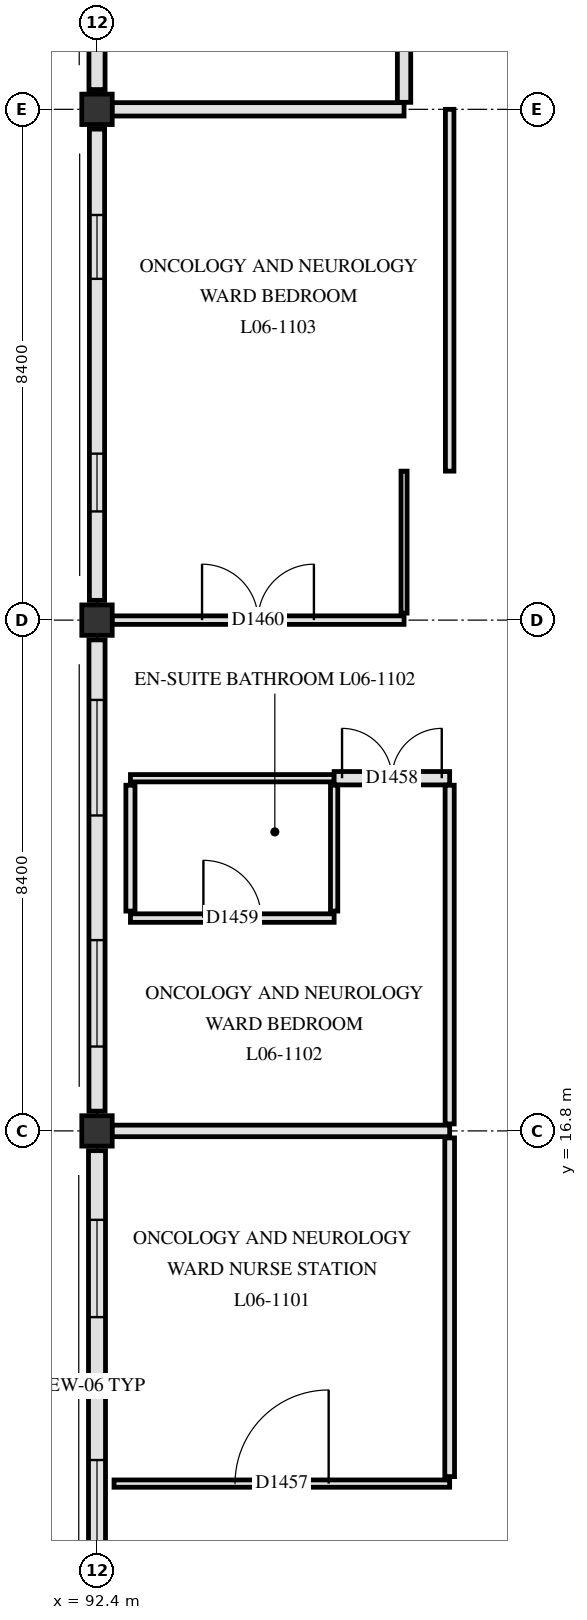
"""IFC4 building model, lengths in metres.
Left out: names, types, materials, properties, quantities, classifications, styles, units other than length and angle.
Written with IfcOpenShell. Run it as: python <this file> out.ifc"""

import sys

from ifc_helpers import new_model, si_unit, direction, frame, frame_2d, origin, origin_2d, place, context, subcontext, project, spatial, rectangle, extrude, element, fill, save


model = new_model("IFC4")
c1 = context("Model", 3, precision=1e-05, world=origin(), true_north=direction((0.0, 1.0)))
c2 = subcontext(c1, "Body", "Model", "MODEL_VIEW")
j1 = project(units=[si_unit("LENGTHUNIT", "METRE"), si_unit("PLANEANGLEUNIT", "RADIAN")], contexts=[c1])
p1 = place(None, origin())
s1 = spatial("IfcSite", under=j1, at=p1, CompositionType="ELEMENT")
p2 = place(p1, origin())
s2 = spatial("IfcBuilding", under=s1, at=p2, CompositionType="ELEMENT")
p3 = place(p2, frame((0.0, 0.0, 26.4)))
s3 = spatial("IfcBuildingStorey", under=s2, at=p3, CompositionType="ELEMENT", Elevation=26.4)
for number, where, z_axis, x_axis in (
    (1, (92.4, 16.8, 0.0), (0.0, 0.0, 1.0), (1.0, 0.0, 0.0)),
    (2, (92.4, 25.2, 0.0), (0.0, 0.0, 1.0), (1.0, 0.0, 0.0)),
    (3, (92.4, 33.6, 0.0), (0.0, 0.0, 1.0), (1.0, 0.0, 0.0)),
):
    element("IfcColumn", number, at=place(p3, frame(where, z_axis=z_axis, x_axis=x_axis)), inside=s3, PredefinedType="COLUMN", context=c2, shape_type="SweptSolid", body=[
        extrude(rectangle(XDim=0.5, YDim=0.5, at=origin_2d()), origin(), (0.0, 0.0, 1.0), 3.9),
    ])
p4 = place(p3, frame((92.4, 33.925, 0.0), z_axis=(0.0, 0.0, 1.0), x_axis=(0.0, 1.0, 0.0)))
e4 = element("IfcWall", 4, at=p4, inside=s3, PredefinedType="SOLIDWALL", context=c2, shape_type="SweptSolid", body=[
    extrude(rectangle(XDim=7.75, YDim=0.265, at=frame_2d((3.875, 0.0))), origin(), (0.0, 0.0, 1.0), 3.38),
])
p5 = place(p4, frame((1.062, 0.0, 0.85)))
e5 = element("IfcOpeningElement", 5, at=p5, cuts=e4, PredefinedType="OPENING", context=c2, shape_type="SweptSolid", body=[
    extrude(rectangle(XDim=1.75, YDim=1.3, at=frame_2d((0.875, 0.65))), frame((0.0, 0.142, 0.0), z_axis=(0.0, -1.0, 0.0), x_axis=(1.0, 0.0, 0.0)), (0.0, 0.0, 1.0), 0.285),
])
p6 = place(p4, frame((4.887, 0.0, 0.85)))
e6 = element("IfcOpeningElement", 6, at=p6, cuts=e4, PredefinedType="OPENING", context=c2, shape_type="SweptSolid", body=[
    extrude(rectangle(XDim=1.85, YDim=1.3, at=frame_2d((0.925, 0.65))), frame((0.0, 0.142, 0.0), z_axis=(0.0, -1.0, 0.0), x_axis=(1.0, 0.0, 0.0)), (0.0, 0.0, 1.0), 0.285),
])
p7 = place(p3, frame((92.4, 8.725, 0.0), z_axis=(0.0, 0.0, 1.0), x_axis=(0.0, 1.0, 0.0)))
e7 = element("IfcWall", 7, at=p7, inside=s3, PredefinedType="SOLIDWALL", context=c2, shape_type="SweptSolid", body=[
    extrude(rectangle(XDim=7.75, YDim=0.28, at=frame_2d((3.875, 0.0))), origin(), (0.0, 0.0, 1.0), 3.34),
])
p8 = place(p7, frame((1.212, 0.0, 0.85)))
e8 = element("IfcOpeningElement", 8, at=p8, cuts=e7, PredefinedType="OPENING", context=c2, shape_type="SweptSolid", body=[
    extrude(rectangle(XDim=1.45, YDim=1.78, at=frame_2d((0.725, 0.89))), frame((0.0, 0.15, 0.0), z_axis=(0.0, -1.0, 0.0), x_axis=(1.0, 0.0, 0.0)), (0.0, 0.0, 1.0), 0.3),
])
p9 = place(p7, frame((5.012, 0.0, 0.85)))
e9 = element("IfcOpeningElement", 9, at=p9, cuts=e7, PredefinedType="OPENING", context=c2, shape_type="SweptSolid", body=[
    extrude(rectangle(XDim=1.6, YDim=1.78, at=frame_2d((0.8, 0.89))), frame((0.0, 0.15, 0.0), z_axis=(0.0, -1.0, 0.0), x_axis=(1.0, 0.0, 0.0)), (0.0, 0.0, 1.0), 0.3),
])
p10 = place(p3, frame((92.4, 17.125, 0.0), z_axis=(0.0, 0.0, 1.0), x_axis=(0.0, 1.0, 0.0)))
e10 = element("IfcWall", 10, at=p10, inside=s3, PredefinedType="SOLIDWALL", context=c2, shape_type="SweptSolid", body=[
    extrude(rectangle(XDim=7.75, YDim=0.265, at=frame_2d((3.875, 0.0))), origin(), (0.0, 0.0, 1.0), 3.38),
])
p11 = place(p10, frame((1.062, 0.0, 0.85)))
e11 = element("IfcOpeningElement", 11, at=p11, cuts=e10, PredefinedType="OPENING", context=c2, shape_type="SweptSolid", body=[
    extrude(rectangle(XDim=1.75, YDim=1.78, at=frame_2d((0.875, 0.89))), frame((0.0, 0.142, 0.0), z_axis=(0.0, -1.0, 0.0), x_axis=(1.0, 0.0, 0.0)), (0.0, 0.0, 1.0), 0.285),
])
p12 = place(p10, frame((4.863, 0.0, 0.85)))
e12 = element("IfcOpeningElement", 12, at=p12, cuts=e10, PredefinedType="OPENING", context=c2, shape_type="SweptSolid", body=[
    extrude(rectangle(XDim=1.9, YDim=1.78, at=frame_2d((0.95, 0.89))), frame((0.0, 0.142, 0.0), z_axis=(0.0, -1.0, 0.0), x_axis=(1.0, 0.0, 0.0)), (0.0, 0.0, 1.0), 0.285),
])
p13 = place(p3, frame((92.4, 25.525, 0.0), z_axis=(0.0, 0.0, 1.0), x_axis=(0.0, 1.0, 0.0)))
e13 = element("IfcWall", 13, at=p13, inside=s3, PredefinedType="SOLIDWALL", context=c2, shape_type="SweptSolid", body=[
    extrude(rectangle(XDim=7.75, YDim=0.25, at=frame_2d((3.875, 0.0))), origin(), (0.0, 0.0, 1.0), 3.38),
])
p14 = place(p13, frame((1.462, 0.0, 0.85)))
e14 = element("IfcOpeningElement", 14, at=p14, cuts=e13, PredefinedType="OPENING", context=c2, shape_type="SweptSolid", body=[
    extrude(rectangle(XDim=0.95, YDim=1.3, at=frame_2d((0.475, 0.65))), frame((0.0, 0.135, 0.0), z_axis=(0.0, -1.0, 0.0), x_axis=(1.0, 0.0, 0.0)), (0.0, 0.0, 1.0), 0.27),
])
p15 = place(p13, frame((5.288, 0.0, 0.85)))
e15 = element("IfcOpeningElement", 15, at=p15, cuts=e13, PredefinedType="OPENING", context=c2, shape_type="SweptSolid", body=[
    extrude(rectangle(XDim=1.05, YDim=1.3, at=frame_2d((0.525, 0.65))), frame((0.0, 0.135, 0.0), z_axis=(0.0, -1.0, 0.0), x_axis=(1.0, 0.0, 0.0)), (0.0, 0.0, 1.0), 0.27),
])
p16 = place(p3, frame((92.68, 11.0, 0.0), z_axis=(0.0, 0.0, 1.0), x_axis=(1.0, 0.0, 0.0)))
e16 = element("IfcWall", 16, at=p16, inside=s3, PredefinedType="PARTITIONING", context=c2, shape_type="SweptSolid", body=[
    extrude(rectangle(XDim=5.52, YDim=0.12, at=frame_2d((2.76, 0.0))), origin(), (0.0, 0.0, 1.0), 3.61),
])
p17 = place(p16, frame((1.99, 0.0, 0.0)))
e17 = element("IfcOpeningElement", 17, at=p17, cuts=e16, PredefinedType="OPENING", context=c2, shape_type="SweptSolid", body=[
    extrude(rectangle(XDim=1.54, YDim=2.24, at=frame_2d((0.77, 1.12))), frame((0.0, 0.07, 0.0), z_axis=(0.0, -1.0, 0.0), x_axis=(1.0, 0.0, 0.0)), (0.0, 0.0, 1.0), 0.14),
])
p18 = place(p3, frame((92.645, 16.8, 0.0), z_axis=(0.0, 0.0, 1.0), x_axis=(1.0, 0.0, 0.0)))
e18 = element("IfcWall", 18, at=p18, inside=s3, PredefinedType="PARTITIONING", context=c2, shape_type="SweptSolid", body=[
    extrude(rectangle(XDim=5.555, YDim=0.19, at=frame_2d((2.777, 0.0))), origin(), (0.0, 0.0, 1.0), 3.21),
])
p19 = place(p3, frame((92.95, 20.3, 0.0), z_axis=(0.0, 0.0, 1.0), x_axis=(1.0, 0.0, 0.0)))
e19 = element("IfcWall", 19, at=p19, inside=s3, PredefinedType="PARTITIONING", context=c2, shape_type="SweptSolid", body=[
    extrude(rectangle(XDim=3.35, YDim=0.14, at=frame_2d((1.675, 0.0))), origin(), (0.0, 0.0, 1.0), 3.61),
])
p20 = place(p19, frame((1.2, 0.0, 0.0)))
e20 = element("IfcOpeningElement", 20, at=p20, cuts=e19, PredefinedType="OPENING", context=c2, shape_type="SweptSolid", body=[
    extrude(rectangle(XDim=0.95, YDim=2.1, at=frame_2d((0.475, 1.05))), frame((0.0, 0.08, 0.0), z_axis=(0.0, -1.0, 0.0), x_axis=(1.0, 0.0, 0.0)), (0.0, 0.0, 1.0), 0.16),
])
p21 = place(p3, frame((92.95, 22.6, 0.0), z_axis=(0.0, 0.0, 1.0), x_axis=(1.0, 0.0, 0.0)))
e21 = element("IfcWall", 21, at=p21, inside=s3, PredefinedType="PARTITIONING", context=c2, shape_type="SweptSolid", body=[
    extrude(rectangle(XDim=3.35, YDim=0.12, at=frame_2d((1.675, 0.0))), origin(), (0.0, 0.0, 1.0), 3.61),
])
p22 = place(p3, frame((96.3, 22.6, 0.0), z_axis=(0.0, 0.0, 1.0), x_axis=(1.0, 0.0, 0.0)))
e22 = element("IfcWall", 22, at=p22, inside=s3, PredefinedType="PARTITIONING", context=c2, shape_type="SweptSolid", body=[
    extrude(rectangle(XDim=1.9, YDim=0.22, at=frame_2d((0.95, 0.0))), origin(), (0.0, 0.0, 1.0), 3.34),
])
p23 = place(p22, frame((0.13, 0.0, 0.0)))
e23 = element("IfcOpeningElement", 23, at=p23, cuts=e22, PredefinedType="OPENING", context=c2, shape_type="SweptSolid", body=[
    extrude(rectangle(XDim=1.64, YDim=2.28, at=frame_2d((0.82, 1.14))), frame((0.0, 0.12, 0.0), z_axis=(0.0, -1.0, 0.0), x_axis=(1.0, 0.0, 0.0)), (0.0, 0.0, 1.0), 0.24),
])
p24 = place(p3, frame((92.645, 25.2, 0.0), z_axis=(0.0, 0.0, 1.0), x_axis=(1.0, 0.0, 0.0)))
e24 = element("IfcWall", 24, at=p24, inside=s3, PredefinedType="PARTITIONING", context=c2, shape_type="SweptSolid", body=[
    extrude(rectangle(XDim=4.805, YDim=0.14, at=frame_2d((2.402, 0.0))), origin(), (0.0, 0.0, 1.0), 3.21),
])
p25 = place(p24, frame((1.482, 0.0, 0.0)))
e25 = element("IfcOpeningElement", 25, at=p25, cuts=e24, PredefinedType="OPENING", context=c2, shape_type="SweptSolid", body=[
    extrude(rectangle(XDim=1.84, YDim=2.28, at=frame_2d((0.92, 1.14))), frame((0.0, 0.08, 0.0), z_axis=(0.0, -1.0, 0.0), x_axis=(1.0, 0.0, 0.0)), (0.0, 0.0, 1.0), 0.16),
])
p26 = place(p3, frame((92.645, 33.6, 0.0), z_axis=(0.0, 0.0, 1.0), x_axis=(1.0, 0.0, 0.0)))
e26 = element("IfcWall", 26, at=p26, inside=s3, PredefinedType="PARTITIONING", context=c2, shape_type="SweptSolid", body=[
    extrude(rectangle(XDim=4.805, YDim=0.22, at=frame_2d((2.402, 0.0))), origin(), (0.0, 0.0, 1.0), 3.21),
])
p27 = place(p3, frame((92.95, 20.415, 0.0), z_axis=(0.0, 0.0, 1.0), x_axis=(0.0, 1.0, 0.0)))
e27 = element("IfcWall", 27, at=p27, inside=s3, PredefinedType="PARTITIONING", context=c2, shape_type="SweptSolid", body=[
    extrude(rectangle(XDim=2.07, YDim=0.15, at=frame_2d((1.035, 0.0))), origin(), (0.0, 0.0, 1.0), 3.34),
])
p28 = place(p3, frame((96.3, 20.415, 0.0), z_axis=(0.0, 0.0, 1.0), x_axis=(0.0, 1.0, 0.0)))
e28 = element("IfcWall", 28, at=p28, inside=s3, PredefinedType="PARTITIONING", context=c2, shape_type="SweptSolid", body=[
    extrude(rectangle(XDim=2.07, YDim=0.12, at=frame_2d((1.035, 0.0))), origin(), (0.0, 0.0, 1.0), 3.34),
])
p29 = place(p3, frame((97.45, 25.315, 0.0), z_axis=(0.0, 0.0, 1.0), x_axis=(0.0, 1.0, 0.0)))
e29 = element("IfcWall", 29, at=p29, inside=s3, PredefinedType="PARTITIONING", context=c2, shape_type="SweptSolid", body=[
    extrude(rectangle(XDim=2.335, YDim=0.1, at=frame_2d((1.167, 0.0))), origin(), (0.0, 0.0, 1.0), 3.61),
])
p30 = place(p3, frame((97.45, 33.715, 0.0), z_axis=(0.0, 0.0, 1.0), x_axis=(0.0, 1.0, 0.0)))
e30 = element("IfcWall", 30, at=p30, inside=s3, PredefinedType="PARTITIONING", context=c2, shape_type="SweptSolid", body=[
    extrude(rectangle(XDim=2.335, YDim=0.22, at=frame_2d((1.167, 0.0))), origin(), (0.0, 0.0, 1.0), 3.61),
])
p31 = place(p3, frame((98.2, 11.115, 0.0), z_axis=(0.0, 0.0, 1.0), x_axis=(0.0, 1.0, 0.0)))
e31 = element("IfcWall", 31, at=p31, inside=s3, PredefinedType="PARTITIONING", context=c2, shape_type="SweptSolid", body=[
    extrude(rectangle(XDim=5.57, YDim=0.16, at=frame_2d((2.785, 0.0))), origin(), (0.0, 0.0, 1.0), 3.34),
])
p32 = place(p3, frame((98.2, 16.915, 0.0), z_axis=(0.0, 0.0, 1.0), x_axis=(0.0, 1.0, 0.0)))
e32 = element("IfcWall", 32, at=p32, inside=s3, PredefinedType="PARTITIONING", context=c2, shape_type="SweptSolid", body=[
    extrude(rectangle(XDim=5.57, YDim=0.15, at=frame_2d((2.785, 0.0))), origin(), (0.0, 0.0, 1.0), 3.34),
])
p33 = place(p3, frame((98.2, 27.65, 0.0), z_axis=(0.0, 0.0, 1.0), x_axis=(0.0, 1.0, 0.0)))
e33 = element("IfcWall", 33, at=p33, inside=s3, PredefinedType="PARTITIONING", context=c2, shape_type="SweptSolid", body=[
    extrude(rectangle(XDim=5.95, YDim=0.14, at=frame_2d((2.975, 0.0))), origin(), (0.0, 0.0, 1.0), 3.21),
])
p34 = place(p8, origin())
e34 = element("IfcWindow", 34, at=p34, inside=s3, PartitioningType="SINGLE_PANEL", PredefinedType="WINDOW", context=c2, shape_type="SweptSolid", body=[
    extrude(rectangle(XDim=1.45, YDim=1.78, at=frame_2d((0.725, 0.89))), frame((0.0, 0.03, 0.0), z_axis=(0.0, -1.0, 0.0), x_axis=(1.0, 0.0, 0.0)), (0.0, 0.0, 1.0), 0.06),
])
fill(e8, e34)
p35 = place(p9, origin())
e35 = element("IfcWindow", 35, at=p35, inside=s3, PartitioningType="SINGLE_PANEL", PredefinedType="WINDOW", context=c2, shape_type="SweptSolid", body=[
    extrude(rectangle(XDim=1.6, YDim=1.78, at=frame_2d((0.8, 0.89))), frame((0.0, 0.03, 0.0), z_axis=(0.0, -1.0, 0.0), x_axis=(1.0, 0.0, 0.0)), (0.0, 0.0, 1.0), 0.06),
])
fill(e9, e35)
p36 = place(p11, origin())
e36 = element("IfcWindow", 36, at=p36, inside=s3, PartitioningType="SINGLE_PANEL", PredefinedType="WINDOW", context=c2, shape_type="SweptSolid", body=[
    extrude(rectangle(XDim=1.75, YDim=1.78, at=frame_2d((0.875, 0.89))), frame((0.0, 0.03, 0.0), z_axis=(0.0, -1.0, 0.0), x_axis=(1.0, 0.0, 0.0)), (0.0, 0.0, 1.0), 0.06),
])
fill(e11, e36)
p37 = place(p12, origin())
e37 = element("IfcWindow", 37, at=p37, inside=s3, PartitioningType="SINGLE_PANEL", PredefinedType="WINDOW", context=c2, shape_type="SweptSolid", body=[
    extrude(rectangle(XDim=1.9, YDim=1.78, at=frame_2d((0.95, 0.89))), frame((0.0, 0.03, 0.0), z_axis=(0.0, -1.0, 0.0), x_axis=(1.0, 0.0, 0.0)), (0.0, 0.0, 1.0), 0.06),
])
fill(e12, e37)
p38 = place(p14, origin())
e38 = element("IfcWindow", 38, at=p38, inside=s3, PartitioningType="SINGLE_PANEL", PredefinedType="WINDOW", context=c2, shape_type="SweptSolid", body=[
    extrude(rectangle(XDim=0.95, YDim=1.3, at=frame_2d((0.475, 0.65))), frame((0.0, 0.03, 0.0), z_axis=(0.0, -1.0, 0.0), x_axis=(1.0, 0.0, 0.0)), (0.0, 0.0, 1.0), 0.06),
])
fill(e14, e38)
p39 = place(p15, origin())
e39 = element("IfcWindow", 39, at=p39, inside=s3, PartitioningType="SINGLE_PANEL", PredefinedType="WINDOW", context=c2, shape_type="SweptSolid", body=[
    extrude(rectangle(XDim=1.05, YDim=1.3, at=frame_2d((0.525, 0.65))), frame((0.0, 0.03, 0.0), z_axis=(0.0, -1.0, 0.0), x_axis=(1.0, 0.0, 0.0)), (0.0, 0.0, 1.0), 0.06),
])
fill(e15, e39)
p40 = place(p17, origin())
e40 = element("IfcDoor", 40, at=p40, inside=s3, OperationType="SINGLE_SWING_RIGHT", PredefinedType="DOOR", context=c2, shape_type="SweptSolid", body=[
    extrude(rectangle(XDim=1.54, YDim=2.24, at=frame_2d((0.77, 1.12))), frame((0.0, 0.025, 0.0), z_axis=(0.0, -1.0, 0.0), x_axis=(1.0, 0.0, 0.0)), (0.0, 0.0, 1.0), 0.05),
])
fill(e17, e40)
p41 = place(p23, origin())
e41 = element("IfcDoor", 41, at=p41, inside=s3, OperationType="DOUBLE_SWING_LEFT", PredefinedType="DOOR", context=c2, shape_type="SweptSolid", body=[
    extrude(rectangle(XDim=1.64, YDim=2.28, at=frame_2d((0.82, 1.14))), frame((0.0, 0.025, 0.0), z_axis=(0.0, -1.0, 0.0), x_axis=(1.0, 0.0, 0.0)), (0.0, 0.0, 1.0), 0.05),
])
fill(e23, e41)
p42 = place(p20, origin())
e42 = element("IfcDoor", 42, at=p42, inside=s3, OperationType="SINGLE_SWING_LEFT", PredefinedType="DOOR", context=c2, shape_type="SweptSolid", body=[
    extrude(rectangle(XDim=0.95, YDim=2.1, at=frame_2d((0.475, 1.05))), frame((0.0, 0.025, 0.0), z_axis=(0.0, -1.0, 0.0), x_axis=(1.0, 0.0, 0.0)), (0.0, 0.0, 1.0), 0.05),
])
fill(e20, e42)
p43 = place(p25, origin())
e43 = element("IfcDoor", 43, at=p43, inside=s3, OperationType="DOUBLE_SWING_LEFT", PredefinedType="DOOR", context=c2, shape_type="SweptSolid", body=[
    extrude(rectangle(XDim=1.84, YDim=2.28, at=frame_2d((0.92, 1.14))), frame((0.0, 0.025, 0.0), z_axis=(0.0, -1.0, 0.0), x_axis=(1.0, 0.0, 0.0)), (0.0, 0.0, 1.0), 0.05),
])
fill(e25, e43)
save(model, sys.argv[1])
